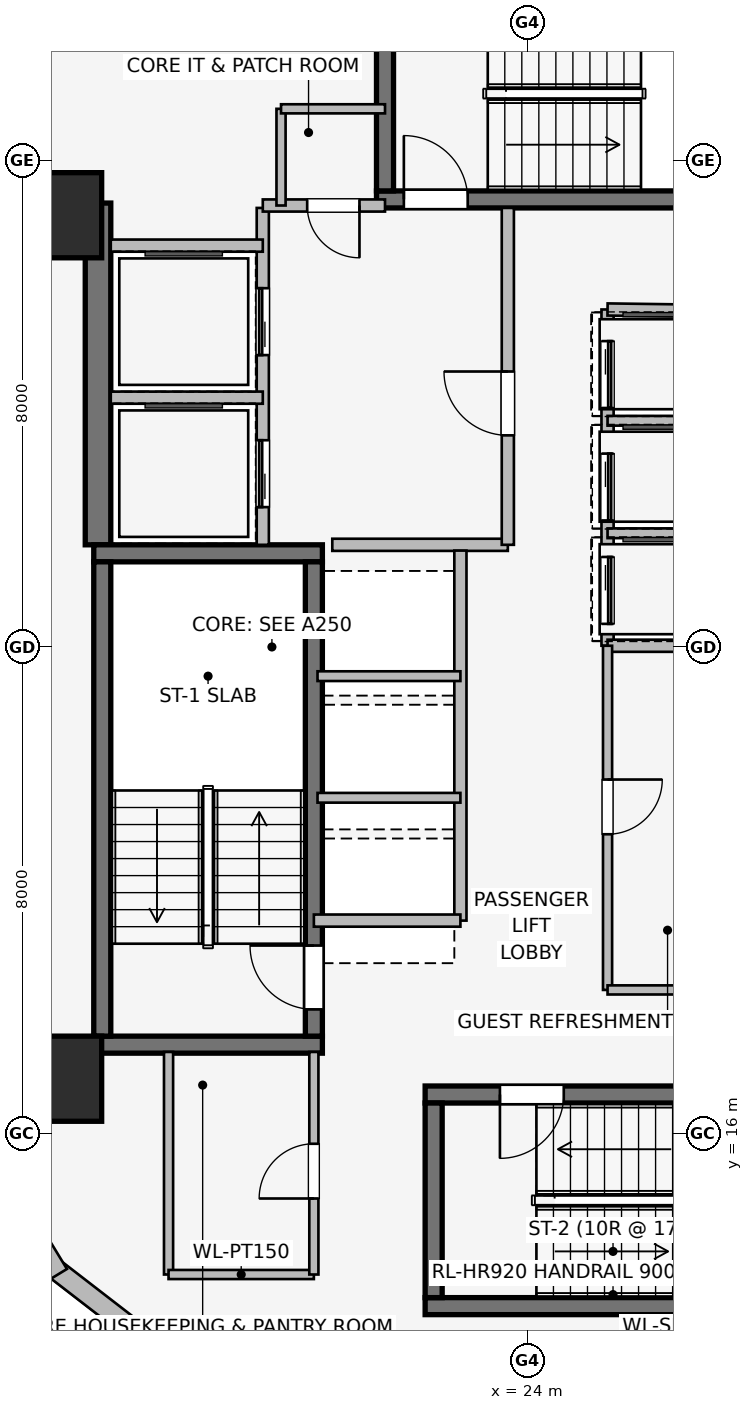
"""IFC4 building model, lengths in metres.
Left out: names, types, materials, properties, quantities, classifications, styles, units other than length and angle.
Written with IfcOpenShell. Run it as: python <this file> out.ifc"""

import sys

from ifc_helpers import new_model, si_unit, direction, frame, frame_2d, origin, origin_2d, place, context, subcontext, project, spatial, rectangle, extrude, element, fill, save


model = new_model("IFC4")
c1 = context("Model", 3, precision=1e-05, world=origin(), true_north=direction((0.0, 1.0)))
c2 = subcontext(c1, "Body", "Model", "MODEL_VIEW")
j1 = project(units=[si_unit("LENGTHUNIT", "METRE"), si_unit("PLANEANGLEUNIT", "RADIAN")], contexts=[c1])
p1 = place(None, origin())
s1 = spatial("IfcSite", under=j1, at=p1, CompositionType="ELEMENT")
p2 = place(p1, origin())
s2 = spatial("IfcBuilding", under=s1, at=p2, CompositionType="ELEMENT")
p3 = place(p2, frame((0.0, 0.0, 177.45)))
s3 = spatial("IfcBuildingStorey", under=s2, at=p3, CompositionType="ELEMENT", Elevation=177.45)
p4 = place(p3, frame((16.94, 25.68, 0.0), z_axis=(0.0, 0.0, 1.0), x_axis=(0.0, 1.0, 0.0)))
e1 = element("IfcWall", 1, at=p4, inside=s3, PredefinedType="SHEAR", context=c2, shape_type="SweptSolid", body=[
    extrude(rectangle(XDim=5.62, YDim=0.42, at=frame_2d((2.81, 0.0))), origin(), (0.0, 0.0, 1.0), 3.45),
])
for number, where, z_axis, x_axis in (
    (2, (16.87, 17.46, 0.0), (0.0, 0.0, 1.0), (1.0, 0.0, 0.0)),
    (3, (20.63, 25.54, 0.0), (0.0, 0.0, 1.0), (-1.0, 0.0, 0.0)),
):
    element("IfcWall", number, at=place(p3, frame(where, z_axis=z_axis, x_axis=x_axis)), inside=s3, PredefinedType="SHEAR", context=c2, shape_type="SweptSolid", body=[
        extrude(rectangle(XDim=3.76, YDim=0.28, at=frame_2d((1.88, 0.0))), origin(), (0.0, 0.0, 1.0), 3.45),
    ])
p5 = place(p3, frame((17.01, 25.4, 0.0), z_axis=(0.0, 0.0, 1.0), x_axis=(0.0, -1.0, 0.0)))
e4 = element("IfcWall", 4, at=p5, inside=s3, PredefinedType="SHEAR", context=c2, shape_type="SweptSolid", body=[
    extrude(rectangle(XDim=7.8, YDim=0.28, at=frame_2d((3.9, 0.0))), origin(), (0.0, 0.0, 1.0), 3.45),
])
p6 = place(p3, frame((20.49, 17.6, 0.0), z_axis=(0.0, 0.0, 1.0), x_axis=(0.0, 1.0, 0.0)))
e5 = element("IfcWall", 5, at=p6, inside=s3, PredefinedType="SHEAR", context=c2, shape_type="SweptSolid", body=[
    extrude(rectangle(XDim=7.8, YDim=0.28, at=frame_2d((3.9, 0.0))), origin(), (0.0, 0.0, 1.0), 3.45),
])
p7 = place(p6, frame((0.44, 0.0, 0.0)))
e6 = element("IfcOpeningElement", 6, at=p7, cuts=e5, PredefinedType="OPENING", context=c2, shape_type="SweptSolid", body=[
    extrude(rectangle(XDim=1.05, YDim=2.0, at=frame_2d((0.525, 1.0))), frame((0.0, 0.15, 0.0), z_axis=(0.0, -1.0, 0.0), x_axis=(1.0, 0.0, 0.0)), (0.0, 0.0, 1.0), 0.3),
])
p8 = place(p3, frame((22.32, 13.16, 0.0), z_axis=(0.0, 0.0, 1.0), x_axis=(1.0, 0.0, 0.0)))
e7 = element("IfcWall", 7, at=p8, inside=s3, PredefinedType="SHEAR", context=c2, shape_type="SweptSolid", body=[
    extrude(rectangle(XDim=8.36, YDim=0.28, at=frame_2d((4.18, 0.0))), origin(), (0.0, 0.0, 1.0), 3.45),
])
p9 = place(p3, frame((30.68, 16.64, 0.0), z_axis=(0.0, 0.0, 1.0), x_axis=(-1.0, 0.0, 0.0)))
e8 = element("IfcWall", 8, at=p9, inside=s3, PredefinedType="SHEAR", context=c2, shape_type="SweptSolid", body=[
    extrude(rectangle(XDim=8.36, YDim=0.28, at=frame_2d((4.18, 0.0))), origin(), (0.0, 0.0, 1.0), 3.45),
])
p10 = place(p9, frame((6.08, 0.0, 0.0)))
e9 = element("IfcOpeningElement", 9, at=p10, cuts=e8, PredefinedType="OPENING", context=c2, shape_type="SweptSolid", body=[
    extrude(rectangle(XDim=1.05, YDim=2.0, at=frame_2d((0.525, 1.0))), frame((0.0, 0.15, 0.0), z_axis=(0.0, -1.0, 0.0), x_axis=(1.0, 0.0, 0.0)), (0.0, 0.0, 1.0), 0.3),
])
p11 = place(p3, frame((22.46, 16.5, 0.0), z_axis=(0.0, 0.0, 1.0), x_axis=(0.0, -1.0, 0.0)))
e10 = element("IfcWall", 10, at=p11, inside=s3, PredefinedType="SHEAR", context=c2, shape_type="SweptSolid", body=[
    extrude(rectangle(XDim=3.2, YDim=0.28, at=frame_2d((1.6, 0.0))), origin(), (0.0, 0.0, 1.0), 3.45),
])
p12 = place(p3, frame((21.52, 31.36, 0.0), z_axis=(0.0, 0.0, 1.0), x_axis=(1.0, 0.0, 0.0)))
e11 = element("IfcWall", 11, at=p12, inside=s3, PredefinedType="SHEAR", context=c2, shape_type="SweptSolid", body=[
    extrude(rectangle(XDim=8.36, YDim=0.28, at=frame_2d((4.18, 0.0))), origin(), (0.0, 0.0, 1.0), 3.45),
])
p13 = place(p12, frame((0.45, 0.0, 0.0)))
e12 = element("IfcOpeningElement", 12, at=p13, cuts=e11, PredefinedType="OPENING", context=c2, shape_type="SweptSolid", body=[
    extrude(rectangle(XDim=1.05, YDim=2.0, at=frame_2d((0.525, 1.0))), frame((0.0, 0.15, 0.0), z_axis=(0.0, -1.0, 0.0), x_axis=(1.0, 0.0, 0.0)), (0.0, 0.0, 1.0), 0.3),
])
p14 = place(p3, frame((21.66, 34.7, 0.0), z_axis=(0.0, 0.0, 1.0), x_axis=(0.0, -1.0, 0.0)))
e13 = element("IfcWall", 13, at=p14, inside=s3, PredefinedType="SHEAR", context=c2, shape_type="SweptSolid", body=[
    extrude(rectangle(XDim=3.2, YDim=0.28, at=frame_2d((1.6, 0.0))), origin(), (0.0, 0.0, 1.0), 3.45),
])
for number, where, z_axis, x_axis in (
    (14, (16.3, 16.9, 0.0), (0.0, 0.0, 1.0), (1.0, 0.0, 0.0)),
    (15, (16.3, 31.1, 0.0), (0.0, 0.0, 1.0), (1.0, 0.0, 0.0)),
):
    element("IfcColumn", number, at=place(p3, frame(where, z_axis=z_axis, x_axis=x_axis)), inside=s3, PredefinedType="COLUMN", context=c2, shape_type="SweptSolid", body=[
        extrude(rectangle(XDim=1.4, YDim=1.4, at=origin_2d()), origin(), (0.0, 0.0, 1.0), 3.45),
    ])
p15 = place(p3, frame((15.415, 32.882, 0.0), z_axis=(0.0, 0.0, 1.0), x_axis=(0.520325409202, 0.853968072318, 0.0)))
e16 = element("IfcWall", 16, at=p15, inside=s3, PredefinedType="STANDARD", context=c2, shape_type="SweptSolid", body=[
    extrude(rectangle(XDim=1.678, YDim=0.33, at=frame_2d((0.839, 0.0))), origin(), (0.0, 0.0, 1.0), 3.16),
])
p16 = place(p3, frame((17.489, 12.8, 0.0), z_axis=(0.0, 0.0, 1.0), x_axis=(-0.791409877269, 0.611285862884, 0.0)))
e17 = element("IfcWall", 17, at=p16, inside=s3, PredefinedType="STANDARD", context=c2, shape_type="SweptSolid", body=[
    extrude(rectangle(XDim=1.677, YDim=0.33, at=frame_2d((0.838, 0.0))), origin(), (0.0, 0.0, 1.0), 3.16),
])
p17 = place(p3, frame((16.288, 13.685, 0.0), z_axis=(0.0, 0.0, 1.0), x_axis=(-0.520325409202, 0.853968072318, 0.0)))
e18 = element("IfcWall", 18, at=p17, inside=s3, PredefinedType="STANDARD", context=c2, shape_type="SweptSolid", body=[
    extrude(rectangle(XDim=1.678, YDim=0.33, at=frame_2d((0.839, 0.0))), origin(), (0.0, 0.0, 1.0), 3.16),
])
p18 = place(p3, frame((19.65, 25.68, 0.0), z_axis=(0.0, 0.0, 1.0), x_axis=(0.0, 1.0, 0.0)))
e19 = element("IfcWall", 19, at=p18, inside=s3, PredefinedType="PARTITIONING", context=c2, shape_type="SweptSolid", body=[
    extrude(rectangle(XDim=5.54, YDim=0.2, at=frame_2d((2.77, 0.0))), origin(), (0.0, 0.0, 1.0), 3.16),
])
p19 = place(p18, frame((0.62, 0.0, 0.0)))
e20 = element("IfcOpeningElement", 20, at=p19, cuts=e19, PredefinedType="OPENING", context=c2, shape_type="SweptSolid", body=[
    extrude(rectangle(XDim=1.1, YDim=2.2, at=frame_2d((0.55, 1.1))), frame((0.0, 0.11, 0.0), z_axis=(0.0, -1.0, 0.0), x_axis=(1.0, 0.0, 0.0)), (0.0, 0.0, 1.0), 0.22),
])
p20 = place(p18, frame((3.12, 0.0, 0.0)))
e21 = element("IfcOpeningElement", 21, at=p20, cuts=e19, PredefinedType="OPENING", context=c2, shape_type="SweptSolid", body=[
    extrude(rectangle(XDim=1.1, YDim=2.2, at=frame_2d((0.55, 1.1))), frame((0.0, 0.11, 0.0), z_axis=(0.0, -1.0, 0.0), x_axis=(1.0, 0.0, 0.0)), (0.0, 0.0, 1.0), 0.22),
])
p21 = place(p3, frame((20.793, 25.68, 0.0), z_axis=(0.0, 0.0, 1.0), x_axis=(1.0, 0.0, 0.0)))
e22 = element("IfcWall", 22, at=p21, inside=s3, PredefinedType="PARTITIONING", context=c2, shape_type="SweptSolid", body=[
    extrude(rectangle(XDim=2.887, YDim=0.2, at=frame_2d((1.443, 0.0))), origin(), (0.0, 0.0, 1.0), 3.16),
])
p22 = place(p3, frame((23.68, 25.68, 0.0), z_axis=(0.0, 0.0, 1.0), x_axis=(0.0, 1.0, 0.0)))
e23 = element("IfcWall", 23, at=p22, inside=s3, PredefinedType="PARTITIONING", context=c2, shape_type="SweptSolid", body=[
    extrude(rectangle(XDim=5.54, YDim=0.2, at=frame_2d((2.77, 0.0))), origin(), (0.0, 0.0, 1.0), 3.16),
])
p23 = place(p22, frame((1.8, 0.0, 0.0)))
e24 = element("IfcOpeningElement", 24, at=p23, cuts=e23, PredefinedType="OPENING", context=c2, shape_type="SweptSolid", body=[
    extrude(rectangle(XDim=1.05, YDim=2.0, at=frame_2d((0.525, 1.0))), frame((0.0, 0.11, 0.0), z_axis=(0.0, -1.0, 0.0), x_axis=(1.0, 0.0, 0.0)), (0.0, 0.0, 1.0), 0.22),
])
p24 = place(p3, frame((21.66, 31.26, 0.0), z_axis=(0.0, 0.0, 1.0), x_axis=(-1.0, 0.0, 0.0)))
e25 = element("IfcWall", 25, at=p24, inside=s3, PredefinedType="PARTITIONING", context=c2, shape_type="SweptSolid", body=[
    extrude(rectangle(XDim=2.01, YDim=0.2, at=frame_2d((1.005, 0.0))), origin(), (0.0, 0.0, 1.0), 3.16),
])
p25 = place(p24, frame((0.42, 0.0, 0.0)))
e26 = element("IfcOpeningElement", 26, at=p25, cuts=e25, PredefinedType="OPENING", context=c2, shape_type="SweptSolid", body=[
    extrude(rectangle(XDim=0.86, YDim=2.0, at=frame_2d((0.43, 1.0))), frame((0.0, 0.11, 0.0), z_axis=(0.0, -1.0, 0.0), x_axis=(1.0, 0.0, 0.0)), (0.0, 0.0, 1.0), 0.22),
])
p26 = place(p3, frame((17.15, 28.1, 0.0), z_axis=(0.0, 0.0, 1.0), x_axis=(1.0, 0.0, 0.0)))
e27 = element("IfcWall", 27, at=p26, inside=s3, PredefinedType="PARTITIONING", context=c2, shape_type="SweptSolid", body=[
    extrude(rectangle(XDim=2.5, YDim=0.2, at=frame_2d((1.25, 0.0))), origin(), (0.0, 0.0, 1.0), 3.16),
])
p27 = place(p3, frame((19.65, 30.6, 0.0), z_axis=(0.0, 0.0, 1.0), x_axis=(-1.0, 0.0, 0.0)))
e28 = element("IfcWall", 28, at=p27, inside=s3, PredefinedType="PARTITIONING", context=c2, shape_type="SweptSolid", body=[
    extrude(rectangle(XDim=2.5, YDim=0.2, at=frame_2d((1.25, 0.0))), origin(), (0.0, 0.0, 1.0), 2.06),
])
p28 = place(p3, frame((22.9, 19.5, 0.0), z_axis=(0.0, 0.0, 1.0), x_axis=(0.0, 1.0, 0.0)))
e29 = element("IfcWall", 29, at=p28, inside=s3, PredefinedType="PARTITIONING", context=c2, shape_type="SweptSolid", body=[
    extrude(rectangle(XDim=6.085, YDim=0.2, at=frame_2d((3.042, 0.0))), origin(), (0.0, 0.0, 1.0), 3.16),
])
p29 = place(p3, frame((20.49, 19.5, 0.0), z_axis=(0.0, 0.0, 1.0), x_axis=(1.0, 0.0, 0.0)))
e30 = element("IfcWall", 30, at=p29, inside=s3, PredefinedType="PARTITIONING", context=c2, shape_type="SweptSolid", body=[
    extrude(rectangle(XDim=2.41, YDim=0.2, at=frame_2d((1.205, 0.0))), origin(), (0.0, 0.0, 1.0), 2.06),
])
for number, where, z_axis, x_axis in (
    (31, (20.55, 21.52, 0.0), (0.0, 0.0, 1.0), (1.0, 0.0, 0.0)),
    (32, (20.55, 23.52, 0.0), (0.0, 0.0, 1.0), (1.0, 0.0, 0.0)),
):
    element("IfcWall", number, at=place(p3, frame(where, z_axis=z_axis, x_axis=x_axis)), inside=s3, PredefinedType="PARTITIONING", context=c2, shape_type="SweptSolid", body=[
        extrude(rectangle(XDim=2.35, YDim=0.16, at=frame_2d((1.175, 0.0))), origin(), (0.0, 0.0, 1.0), 3.16),
    ])
p30 = place(p3, frame((25.32, 29.55, 0.0), z_axis=(0.0, 0.0, 1.0), x_axis=(0.0, -1.0, 0.0)))
e33 = element("IfcWall", 33, at=p30, inside=s3, PredefinedType="PARTITIONING", context=c2, shape_type="SweptSolid", body=[
    extrude(rectangle(XDim=5.53, YDim=0.2, at=frame_2d((2.765, 0.0))), origin(), (0.0, 0.0, 1.0), 3.16),
])
p31 = place(p30, frame((0.52, 0.0, 0.0)))
e34 = element("IfcOpeningElement", 34, at=p31, cuts=e33, PredefinedType="OPENING", context=c2, shape_type="SweptSolid", body=[
    extrude(rectangle(XDim=1.1, YDim=2.2, at=frame_2d((0.55, 1.1))), frame((0.0, 0.11, 0.0), z_axis=(0.0, -1.0, 0.0), x_axis=(1.0, 0.0, 0.0)), (0.0, 0.0, 1.0), 0.22),
])
p32 = place(p30, frame((2.37, 0.0, 0.0)))
e35 = element("IfcOpeningElement", 35, at=p32, cuts=e33, PredefinedType="OPENING", context=c2, shape_type="SweptSolid", body=[
    extrude(rectangle(XDim=1.1, YDim=2.2, at=frame_2d((0.55, 1.1))), frame((0.0, 0.11, 0.0), z_axis=(0.0, -1.0, 0.0), x_axis=(1.0, 0.0, 0.0)), (0.0, 0.0, 1.0), 0.22),
])
p33 = place(p30, frame((4.07, 0.0, 0.0)))
e36 = element("IfcOpeningElement", 36, at=p33, cuts=e33, PredefinedType="OPENING", context=c2, shape_type="SweptSolid", body=[
    extrude(rectangle(XDim=1.1, YDim=2.2, at=frame_2d((0.55, 1.1))), frame((0.0, 0.11, 0.0), z_axis=(0.0, -1.0, 0.0), x_axis=(1.0, 0.0, 0.0)), (0.0, 0.0, 1.0), 0.22),
])
p34 = place(p3, frame((27.55, 29.52, 0.0), z_axis=(0.0, 0.0, 1.0), x_axis=(-0.999909343457, 0.013464949556, 0.0)))
e37 = element("IfcWall", 37, at=p34, inside=s3, PredefinedType="PARTITIONING", context=c2, shape_type="SweptSolid", body=[
    extrude(rectangle(XDim=2.23, YDim=0.2, at=frame_2d((1.115, 0.0))), origin(), (0.0, 0.0, 1.0), 2.06),
])
p35 = place(p3, frame((25.32, 24.02, 0.0), z_axis=(0.0, 0.0, 1.0), x_axis=(1.0, 0.0, 0.0)))
e38 = element("IfcWall", 38, at=p35, inside=s3, PredefinedType="PARTITIONING", context=c2, shape_type="SweptSolid", body=[
    extrude(rectangle(XDim=2.23, YDim=0.2, at=frame_2d((1.115, 0.0))), origin(), (0.0, 0.0, 1.0), 3.16),
])
for number, where, z_axis, x_axis in (
    (39, (25.32, 25.87, 0.0), (0.0, 0.0, 1.0), (1.0, 0.0, 0.0)),
    (40, (25.32, 27.72, 0.0), (0.0, 0.0, 1.0), (1.0, 0.0, 0.0)),
):
    element("IfcWall", number, at=place(p3, frame(where, z_axis=z_axis, x_axis=x_axis)), inside=s3, PredefinedType="PARTITIONING", context=c2, shape_type="SweptSolid", body=[
        extrude(rectangle(XDim=2.03, YDim=0.16, at=frame_2d((1.015, 0.0))), origin(), (0.0, 0.0, 1.0), 3.16),
    ])
p36 = place(p3, frame((25.32, 24.02, 0.0), z_axis=(0.0, 0.0, 1.0), x_axis=(0.0, -1.0, 0.0)))
e41 = element("IfcWall", 41, at=p36, inside=s3, PredefinedType="PARTITIONING", context=c2, shape_type="SweptSolid", body=[
    extrude(rectangle(XDim=5.66, YDim=0.15, at=frame_2d((2.83, 0.0))), origin(), (0.0, 0.0, 1.0), 3.16),
])
p37 = place(p36, frame((2.2, 0.0, 0.0)))
e42 = element("IfcOpeningElement", 42, at=p37, cuts=e41, PredefinedType="OPENING", context=c2, shape_type="SweptSolid", body=[
    extrude(rectangle(XDim=0.9, YDim=2.0, at=frame_2d((0.45, 1.0))), frame((0.0, 0.085, 0.0), z_axis=(0.0, -1.0, 0.0), x_axis=(1.0, 0.0, 0.0)), (0.0, 0.0, 1.0), 0.17),
])
p38 = place(p3, frame((25.32, 18.36, 0.0), z_axis=(0.0, 0.0, 1.0), x_axis=(1.0, 0.0, 0.0)))
e43 = element("IfcWall", 43, at=p38, inside=s3, PredefinedType="PARTITIONING", context=c2, shape_type="SweptSolid", body=[
    extrude(rectangle(XDim=2.23, YDim=0.15, at=frame_2d((1.115, 0.0))), origin(), (0.0, 0.0, 1.0), 3.16),
])
p39 = place(p3, frame((18.1, 17.34, 0.0), z_axis=(0.0, 0.0, 1.0), x_axis=(0.0, -1.0, 0.0)))
e44 = element("IfcWall", 44, at=p39, inside=s3, PredefinedType="PARTITIONING", context=c2, shape_type="SweptSolid", body=[
    extrude(rectangle(XDim=3.66, YDim=0.15, at=frame_2d((1.83, 0.0))), origin(), (0.0, 0.0, 1.0), 3.16),
])
p40 = place(p3, frame((18.1, 13.68, 0.0), z_axis=(0.0, 0.0, 1.0), x_axis=(1.0, 0.0, 0.0)))
e45 = element("IfcWall", 45, at=p40, inside=s3, PredefinedType="PARTITIONING", context=c2, shape_type="SweptSolid", body=[
    extrude(rectangle(XDim=2.39, YDim=0.15, at=frame_2d((1.195, 0.0))), origin(), (0.0, 0.0, 1.0), 3.16),
])
p41 = place(p3, frame((20.49, 13.68, 0.0), z_axis=(0.0, 0.0, 1.0), x_axis=(0.0, 1.0, 0.0)))
e46 = element("IfcWall", 46, at=p41, inside=s3, PredefinedType="PARTITIONING", context=c2, shape_type="SweptSolid", body=[
    extrude(rectangle(XDim=3.66, YDim=0.15, at=frame_2d((1.83, 0.0))), origin(), (0.0, 0.0, 1.0), 3.16),
])
p42 = place(p41, frame((1.25, 0.0, 0.0)))
e47 = element("IfcOpeningElement", 47, at=p42, cuts=e46, PredefinedType="OPENING", context=c2, shape_type="SweptSolid", body=[
    extrude(rectangle(XDim=0.9, YDim=2.0, at=frame_2d((0.45, 1.0))), frame((0.0, 0.085, 0.0), z_axis=(0.0, -1.0, 0.0), x_axis=(1.0, 0.0, 0.0)), (0.0, 0.0, 1.0), 0.17),
])
p43 = place(p3, frame((19.95, 32.85, 0.0), z_axis=(0.0, 0.0, 1.0), x_axis=(0.0, -1.0, 0.0)))
e48 = element("IfcWall", 48, at=p43, inside=s3, PredefinedType="PARTITIONING", context=c2, shape_type="SweptSolid", body=[
    extrude(rectangle(XDim=1.59, YDim=0.15, at=frame_2d((0.795, 0.0))), origin(), (0.0, 0.0, 1.0), 3.16),
])
p44 = place(p3, frame((21.66, 32.85, 0.0), z_axis=(0.0, 0.0, 1.0), x_axis=(-1.0, 0.0, 0.0)))
e49 = element("IfcWall", 49, at=p44, inside=s3, PredefinedType="PARTITIONING", context=c2, shape_type="SweptSolid", body=[
    extrude(rectangle(XDim=1.71, YDim=0.15, at=frame_2d((0.855, 0.0))), origin(), (0.0, 0.0, 1.0), 3.16),
])
p45 = place(p7, origin())
e50 = element("IfcDoor", 50, at=p45, inside=s3, OperationType="SINGLE_SWING_RIGHT", PredefinedType="DOOR", context=c2, shape_type="SweptSolid", body=[
    extrude(rectangle(XDim=1.05, YDim=2.0, at=frame_2d((0.525, 1.0))), frame((0.0, 0.025, 0.0), z_axis=(0.0, -1.0, 0.0), x_axis=(1.0, 0.0, 0.0)), (0.0, 0.0, 1.0), 0.05),
])
fill(e6, e50)
p46 = place(p10, origin())
e51 = element("IfcDoor", 51, at=p46, inside=s3, OperationType="SINGLE_SWING_RIGHT", PredefinedType="DOOR", context=c2, shape_type="SweptSolid", body=[
    extrude(rectangle(XDim=1.05, YDim=2.0, at=frame_2d((0.525, 1.0))), frame((0.0, 0.025, 0.0), z_axis=(0.0, -1.0, 0.0), x_axis=(1.0, 0.0, 0.0)), (0.0, 0.0, 1.0), 0.05),
])
fill(e9, e51)
p47 = place(p13, origin())
e52 = element("IfcDoor", 52, at=p47, inside=s3, OperationType="SINGLE_SWING_LEFT", PredefinedType="DOOR", context=c2, shape_type="SweptSolid", body=[
    extrude(rectangle(XDim=1.05, YDim=2.0, at=frame_2d((0.525, 1.0))), frame((0.0, 0.025, 0.0), z_axis=(0.0, -1.0, 0.0), x_axis=(1.0, 0.0, 0.0)), (0.0, 0.0, 1.0), 0.05),
])
fill(e12, e52)
p48 = place(p19, origin())
e53 = element("IfcDoor", 53, at=p48, inside=s3, OperationType="SLIDING_TO_LEFT", PredefinedType="DOOR", context=c2, shape_type="SweptSolid", body=[
    extrude(rectangle(XDim=1.1, YDim=2.2, at=frame_2d((0.55, 1.1))), frame((0.0, 0.025, 0.0), z_axis=(0.0, -1.0, 0.0), x_axis=(1.0, 0.0, 0.0)), (0.0, 0.0, 1.0), 0.05),
])
fill(e20, e53)
p49 = place(p20, origin())
e54 = element("IfcDoor", 54, at=p49, inside=s3, OperationType="SLIDING_TO_LEFT", PredefinedType="DOOR", context=c2, shape_type="SweptSolid", body=[
    extrude(rectangle(XDim=1.1, YDim=2.2, at=frame_2d((0.55, 1.1))), frame((0.0, 0.025, 0.0), z_axis=(0.0, -1.0, 0.0), x_axis=(1.0, 0.0, 0.0)), (0.0, 0.0, 1.0), 0.05),
])
fill(e21, e54)
p50 = place(p23, origin())
e55 = element("IfcDoor", 55, at=p50, inside=s3, OperationType="SINGLE_SWING_RIGHT", PredefinedType="DOOR", context=c2, shape_type="SweptSolid", body=[
    extrude(rectangle(XDim=1.05, YDim=2.0, at=frame_2d((0.525, 1.0))), frame((0.0, 0.025, 0.0), z_axis=(0.0, -1.0, 0.0), x_axis=(1.0, 0.0, 0.0)), (0.0, 0.0, 1.0), 0.05),
])
fill(e24, e55)
p51 = place(p25, origin())
e56 = element("IfcDoor", 56, at=p51, inside=s3, OperationType="SINGLE_SWING_LEFT", PredefinedType="DOOR", context=c2, shape_type="SweptSolid", body=[
    extrude(rectangle(XDim=0.86, YDim=2.0, at=frame_2d((0.43, 1.0))), frame((0.0, 0.025, 0.0), z_axis=(0.0, -1.0, 0.0), x_axis=(1.0, 0.0, 0.0)), (0.0, 0.0, 1.0), 0.05),
])
fill(e26, e56)
p52 = place(p31, origin())
e57 = element("IfcDoor", 57, at=p52, inside=s3, OperationType="SLIDING_TO_LEFT", PredefinedType="DOOR", context=c2, shape_type="SweptSolid", body=[
    extrude(rectangle(XDim=1.1, YDim=2.2, at=frame_2d((0.55, 1.1))), frame((0.0, 0.025, 0.0), z_axis=(0.0, -1.0, 0.0), x_axis=(1.0, 0.0, 0.0)), (0.0, 0.0, 1.0), 0.05),
])
fill(e34, e57)
p53 = place(p32, origin())
e58 = element("IfcDoor", 58, at=p53, inside=s3, OperationType="SLIDING_TO_LEFT", PredefinedType="DOOR", context=c2, shape_type="SweptSolid", body=[
    extrude(rectangle(XDim=1.1, YDim=2.2, at=frame_2d((0.55, 1.1))), frame((0.0, 0.025, 0.0), z_axis=(0.0, -1.0, 0.0), x_axis=(1.0, 0.0, 0.0)), (0.0, 0.0, 1.0), 0.05),
])
fill(e35, e58)
p54 = place(p33, origin())
e59 = element("IfcDoor", 59, at=p54, inside=s3, OperationType="SLIDING_TO_LEFT", PredefinedType="DOOR", context=c2, shape_type="SweptSolid", body=[
    extrude(rectangle(XDim=1.1, YDim=2.2, at=frame_2d((0.55, 1.1))), frame((0.0, 0.025, 0.0), z_axis=(0.0, -1.0, 0.0), x_axis=(1.0, 0.0, 0.0)), (0.0, 0.0, 1.0), 0.05),
])
fill(e36, e59)
p55 = place(p37, origin())
e60 = element("IfcDoor", 60, at=p55, inside=s3, OperationType="SINGLE_SWING_LEFT", PredefinedType="DOOR", context=c2, shape_type="SweptSolid", body=[
    extrude(rectangle(XDim=0.9, YDim=2.0, at=frame_2d((0.45, 1.0))), frame((0.0, 0.025, 0.0), z_axis=(0.0, -1.0, 0.0), x_axis=(1.0, 0.0, 0.0)), (0.0, 0.0, 1.0), 0.05),
])
fill(e42, e60)
p56 = place(p42, origin())
e61 = element("IfcDoor", 61, at=p56, inside=s3, OperationType="SINGLE_SWING_LEFT", PredefinedType="DOOR", context=c2, shape_type="SweptSolid", body=[
    extrude(rectangle(XDim=0.9, YDim=2.0, at=frame_2d((0.45, 1.0))), frame((0.0, 0.025, 0.0), z_axis=(0.0, -1.0, 0.0), x_axis=(1.0, 0.0, 0.0)), (0.0, 0.0, 1.0), 0.05),
])
fill(e47, e61)
save(model, sys.argv[1])
